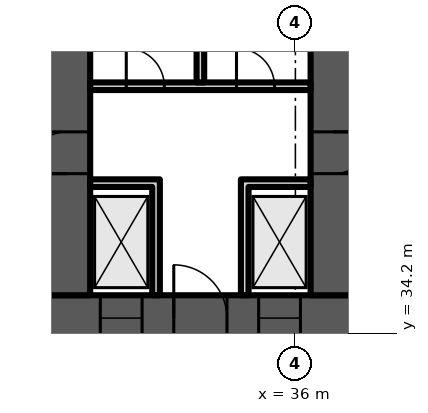
"""IFC4 building model, lengths in metres.
Left out: names, types, materials, properties, quantities, classifications, styles, units other than length and angle.
Written with IfcOpenShell. Run it as: python <this file> out.ifc"""

import sys

from ifc_helpers import new_model, si_unit, direction, frame, frame_2d, origin, place, context, subcontext, project, spatial, polyline, rectangle, outline, extrude, element, fill, save


model = new_model("IFC4")
c1 = context("Model", 3, precision=1e-05, world=origin(), true_north=direction((0.0, 1.0)))
c2 = subcontext(c1, "Body", "Model", "MODEL_VIEW")
j1 = project(units=[si_unit("LENGTHUNIT", "METRE"), si_unit("PLANEANGLEUNIT", "RADIAN")], contexts=[c1])
p1 = place(None, origin())
s1 = spatial("IfcSite", under=j1, at=p1, CompositionType="ELEMENT")
p2 = place(p1, origin())
s2 = spatial("IfcBuilding", under=s1, at=p2, CompositionType="ELEMENT")
p3 = place(p2, frame((0.0, 0.0, 33.0)))
s3 = spatial("IfcBuildingStorey", under=s2, at=p3, CompositionType="ELEMENT", Elevation=33.0)
p4 = place(p3, frame((9.0, 34.6, 0.0), z_axis=(0.0, 0.0, 1.0), x_axis=(1.0, 0.0, 0.0)))
e1 = element("IfcWall", 1, at=p4, inside=s3, PredefinedType="SHEAR", context=c2, shape_type="SweptSolid", body=[
    extrude(rectangle(XDim=56.0, YDim=1.2, at=frame_2d((28.0, 0.0))), origin(), (0.0, 0.0, 1.0), 8.1),
])
p5 = place(p4, frame((2.0, 0.0, 0.0)))
e2 = element("IfcOpeningElement", 2, at=p5, cuts=e1, PredefinedType="OPENING", context=c2, shape_type="SweptSolid", body=[
    extrude(rectangle(XDim=1.0, YDim=2.1, at=frame_2d((0.5, 1.05))), frame((0.0, 0.61, 0.0), z_axis=(0.0, -1.0, 0.0), x_axis=(1.0, 0.0, 0.0)), (0.0, 0.0, 1.0), 1.22),
])
p6 = place(p4, frame((4.6, 0.0, 0.0)))
e3 = element("IfcOpeningElement", 3, at=p6, cuts=e1, PredefinedType="OPENING", context=c2, shape_type="SweptSolid", body=[
    extrude(rectangle(XDim=1.0, YDim=2.1, at=frame_2d((0.5, 1.05))), frame((0.0, 0.61, 0.0), z_axis=(0.0, -1.0, 0.0), x_axis=(1.0, 0.0, 0.0)), (0.0, 0.0, 1.0), 1.22),
])
p7 = place(p4, frame((7.867, 0.0, 0.0)))
e4 = element("IfcOpeningElement", 4, at=p7, cuts=e1, PredefinedType="OPENING", context=c2, shape_type="SweptSolid", body=[
    extrude(rectangle(XDim=1.1, YDim=2.1, at=frame_2d((0.55, 1.05))), frame((0.0, 0.61, 0.0), z_axis=(0.0, -1.0, 0.0), x_axis=(1.0, 0.0, 0.0)), (0.0, 0.0, 1.0), 1.22),
])
p8 = place(p4, frame((12.033, 0.0, 0.0)))
e5 = element("IfcOpeningElement", 5, at=p8, cuts=e1, PredefinedType="OPENING", context=c2, shape_type="SweptSolid", body=[
    extrude(rectangle(XDim=1.1, YDim=2.1, at=frame_2d((0.55, 1.05))), frame((0.0, 0.61, 0.0), z_axis=(0.0, -1.0, 0.0), x_axis=(1.0, 0.0, 0.0)), (0.0, 0.0, 1.0), 1.22),
])
p9 = place(p4, frame((9.8, 0.0, 0.0)))
e6 = element("IfcOpeningElement", 6, at=p9, cuts=e1, PredefinedType="OPENING", context=c2, shape_type="SweptSolid", body=[
    extrude(rectangle(XDim=1.4, YDim=2.1, at=frame_2d((0.7, 1.05))), frame((0.0, 0.61, 0.0), z_axis=(0.0, -1.0, 0.0), x_axis=(1.0, 0.0, 0.0)), (0.0, 0.0, 1.0), 1.22),
])
p10 = place(p4, frame((14.65, 0.0, 0.0)))
e7 = element("IfcOpeningElement", 7, at=p10, cuts=e1, PredefinedType="OPENING", context=c2, shape_type="SweptSolid", body=[
    extrude(rectangle(XDim=1.2, YDim=2.1, at=frame_2d((0.6, 1.05))), frame((0.0, 0.61, 0.0), z_axis=(0.0, -1.0, 0.0), x_axis=(1.0, 0.0, 0.0)), (0.0, 0.0, 1.0), 1.22),
])
p11 = place(p4, frame((21.867, 0.0, 0.0)))
e8 = element("IfcOpeningElement", 8, at=p11, cuts=e1, PredefinedType="OPENING", context=c2, shape_type="SweptSolid", body=[
    extrude(rectangle(XDim=1.1, YDim=2.1, at=frame_2d((0.55, 1.05))), frame((0.0, 0.61, 0.0), z_axis=(0.0, -1.0, 0.0), x_axis=(1.0, 0.0, 0.0)), (0.0, 0.0, 1.0), 1.22),
])
p12 = place(p4, frame((26.033, 0.0, 0.0)))
e9 = element("IfcOpeningElement", 9, at=p12, cuts=e1, PredefinedType="OPENING", context=c2, shape_type="SweptSolid", body=[
    extrude(rectangle(XDim=1.1, YDim=2.1, at=frame_2d((0.55, 1.05))), frame((0.0, 0.61, 0.0), z_axis=(0.0, -1.0, 0.0), x_axis=(1.0, 0.0, 0.0)), (0.0, 0.0, 1.0), 1.22),
])
p13 = place(p4, frame((23.8, 0.0, 0.0)))
e10 = element("IfcOpeningElement", 10, at=p13, cuts=e1, PredefinedType="OPENING", context=c2, shape_type="SweptSolid", body=[
    extrude(rectangle(XDim=1.4, YDim=2.1, at=frame_2d((0.7, 1.05))), frame((0.0, 0.61, 0.0), z_axis=(0.0, -1.0, 0.0), x_axis=(1.0, 0.0, 0.0)), (0.0, 0.0, 1.0), 1.22),
])
p14 = place(p4, frame((28.867, 0.0, 0.0)))
e11 = element("IfcOpeningElement", 11, at=p14, cuts=e1, PredefinedType="OPENING", context=c2, shape_type="SweptSolid", body=[
    extrude(rectangle(XDim=1.1, YDim=2.1, at=frame_2d((0.55, 1.05))), frame((0.0, 0.61, 0.0), z_axis=(0.0, -1.0, 0.0), x_axis=(1.0, 0.0, 0.0)), (0.0, 0.0, 1.0), 1.22),
])
p15 = place(p4, frame((33.033, 0.0, 0.0)))
e12 = element("IfcOpeningElement", 12, at=p15, cuts=e1, PredefinedType="OPENING", context=c2, shape_type="SweptSolid", body=[
    extrude(rectangle(XDim=1.1, YDim=2.1, at=frame_2d((0.55, 1.05))), frame((0.0, 0.61, 0.0), z_axis=(0.0, -1.0, 0.0), x_axis=(1.0, 0.0, 0.0)), (0.0, 0.0, 1.0), 1.22),
])
p16 = place(p4, frame((40.15, 0.0, 0.0)))
e13 = element("IfcOpeningElement", 13, at=p16, cuts=e1, PredefinedType="OPENING", context=c2, shape_type="SweptSolid", body=[
    extrude(rectangle(XDim=1.2, YDim=2.1, at=frame_2d((0.6, 1.05))), frame((0.0, 0.61, 0.0), z_axis=(0.0, -1.0, 0.0), x_axis=(1.0, 0.0, 0.0)), (0.0, 0.0, 1.0), 1.22),
])
p17 = place(p4, frame((44.8, 0.0, 0.0)))
e14 = element("IfcOpeningElement", 14, at=p17, cuts=e1, PredefinedType="OPENING", context=c2, shape_type="SweptSolid", body=[
    extrude(rectangle(XDim=1.4, YDim=2.1, at=frame_2d((0.7, 1.05))), frame((0.0, 0.61, 0.0), z_axis=(0.0, -1.0, 0.0), x_axis=(1.0, 0.0, 0.0)), (0.0, 0.0, 1.0), 1.22),
])
p18 = place(p4, frame((49.867, 0.0, 0.0)))
e15 = element("IfcOpeningElement", 15, at=p18, cuts=e1, PredefinedType="OPENING", context=c2, shape_type="SweptSolid", body=[
    extrude(rectangle(XDim=1.1, YDim=2.1, at=frame_2d((0.55, 1.05))), frame((0.0, 0.61, 0.0), z_axis=(0.0, -1.0, 0.0), x_axis=(1.0, 0.0, 0.0)), (0.0, 0.0, 1.0), 1.22),
])
p19 = place(p4, frame((53.5, 0.0, 0.0)))
e16 = element("IfcOpeningElement", 16, at=p19, cuts=e1, PredefinedType="OPENING", context=c2, shape_type="SweptSolid", body=[
    extrude(rectangle(XDim=1.1, YDim=2.1, at=frame_2d((0.55, 1.05))), frame((0.0, 0.61, 0.0), z_axis=(0.0, -1.0, 0.0), x_axis=(1.0, 0.0, 0.0)), (0.0, 0.0, 1.0), 1.22),
])
p20 = place(p4, frame((51.567, 0.0, 0.0)))
e17 = element("IfcOpeningElement", 17, at=p20, cuts=e1, PredefinedType="OPENING", context=c2, shape_type="SweptSolid", body=[
    extrude(rectangle(XDim=1.4, YDim=2.1, at=frame_2d((0.7, 1.05))), frame((0.0, 0.61, 0.0), z_axis=(0.0, -1.0, 0.0), x_axis=(1.0, 0.0, 0.0)), (0.0, 0.0, 1.0), 1.22),
])
p21 = place(p3, frame((30.0, 35.2, 0.0), z_axis=(0.0, 0.0, 1.0), x_axis=(0.0, 1.0, 0.0)))
e18 = element("IfcWall", 18, at=p21, inside=s3, PredefinedType="SHEAR", context=c2, shape_type="SweptSolid", body=[
    extrude(rectangle(XDim=12.8, YDim=1.2, at=frame_2d((6.4, 0.0))), origin(), (0.0, 0.0, 1.0), 8.1),
])
p22 = place(p21, frame((3.2, 0.0, 0.0)))
e19 = element("IfcOpeningElement", 19, at=p22, cuts=e18, PredefinedType="OPENING", context=c2, shape_type="SweptSolid", body=[
    extrude(rectangle(XDim=1.1, YDim=2.1, at=frame_2d((0.55, 1.05))), frame((0.0, 0.61, 0.0), z_axis=(0.0, -1.0, 0.0), x_axis=(1.0, 0.0, 0.0)), (0.0, 0.0, 1.0), 1.22),
])
p23 = place(p3, frame((37.0, 35.2, 0.0), z_axis=(0.0, 0.0, 1.0), x_axis=(0.0, 1.0, 0.0)))
e20 = element("IfcWall", 20, at=p23, inside=s3, PredefinedType="SHEAR", context=c2, shape_type="SweptSolid", body=[
    extrude(rectangle(XDim=12.8, YDim=1.2, at=frame_2d((6.4, 0.0))), origin(), (0.0, 0.0, 1.0), 8.1),
])
p24 = place(p23, frame((3.2, 0.0, 0.0)))
e21 = element("IfcOpeningElement", 21, at=p24, cuts=e20, PredefinedType="OPENING", context=c2, shape_type="SweptSolid", body=[
    extrude(rectangle(XDim=1.1, YDim=2.1, at=frame_2d((0.55, 1.05))), frame((0.0, 0.61, 0.0), z_axis=(0.0, -1.0, 0.0), x_axis=(1.0, 0.0, 0.0)), (0.0, 0.0, 1.0), 1.22),
])
p25 = place(p23, frame((9.6, 0.0, 0.0)))
e22 = element("IfcOpeningElement", 22, at=p25, cuts=e20, PredefinedType="OPENING", context=c2, shape_type="SweptSolid", body=[
    extrude(rectangle(XDim=1.0, YDim=2.1, at=frame_2d((0.5, 1.05))), frame((0.0, 0.61, 0.0), z_axis=(0.0, -1.0, 0.0), x_axis=(1.0, 0.0, 0.0)), (0.0, 0.0, 1.0), 1.22),
])
p26 = place(p3, frame((30.6, 40.7, 0.0), z_axis=(0.0, 0.0, 1.0), x_axis=(1.0, 0.0, 0.0)))
e23 = element("IfcWall", 23, at=p26, inside=s3, PredefinedType="PARTITIONING", context=c2, shape_type="SweptSolid", body=[
    extrude(rectangle(XDim=5.8, YDim=0.2, at=frame_2d((2.9, 0.0))), origin(), (0.0, 0.0, 1.0), 8.1),
])
p27 = place(p26, frame((0.95, 0.0, 0.0)))
e24 = element("IfcOpeningElement", 24, at=p27, cuts=e23, PredefinedType="OPENING", context=c2, shape_type="SweptSolid", body=[
    extrude(rectangle(XDim=1.0, YDim=2.1, at=frame_2d((0.5, 1.05))), frame((0.0, 0.11, 0.0), z_axis=(0.0, -1.0, 0.0), x_axis=(1.0, 0.0, 0.0)), (0.0, 0.0, 1.0), 0.22),
])
p28 = place(p26, frame((3.85, 0.0, 0.0)))
e25 = element("IfcOpeningElement", 25, at=p28, cuts=e23, PredefinedType="OPENING", context=c2, shape_type="SweptSolid", body=[
    extrude(rectangle(XDim=1.0, YDim=2.1, at=frame_2d((0.5, 1.05))), frame((0.0, 0.11, 0.0), z_axis=(0.0, -1.0, 0.0), x_axis=(1.0, 0.0, 0.0)), (0.0, 0.0, 1.0), 0.22),
])
p29 = place(p3, origin())
e26 = element("IfcWall", 26, at=p29, inside=s3, PredefinedType="PARTITIONING", context=c2, shape_type="SweptSolid", body=[
    extrude(outline(polyline([(32.233, 38.05), (30.6, 38.05), (30.6, 38.25), (32.233, 38.25), (32.433, 38.25), (32.433, 35.2), (32.233, 35.2), (32.233, 38.05)])), origin(), (0.0, 0.0, 1.0), 8.1),
])
p30 = place(p3, origin())
e27 = element("IfcWall", 27, at=p30, inside=s3, PredefinedType="PARTITIONING", context=c2, shape_type="SweptSolid", body=[
    extrude(outline(polyline([(34.567, 38.25), (34.767, 38.25), (36.4, 38.25), (36.4, 38.05), (34.767, 38.05), (34.767, 35.2), (34.567, 35.2), (34.567, 38.25)])), origin(), (0.0, 0.0, 1.0), 8.1),
])
p31 = place(p3, frame((33.5, 40.8, 0.0), z_axis=(0.0, 0.0, 1.0), x_axis=(0.0, 1.0, 0.0)))
e28 = element("IfcWall", 28, at=p31, inside=s3, PredefinedType="PARTITIONING", context=c2, shape_type="SweptSolid", body=[
    extrude(rectangle(XDim=8.653, YDim=0.2, at=frame_2d((4.326, 0.0))), origin(), (0.0, 0.0, 1.0), 8.1),
])
p32 = place(p11, origin())
e29 = element("IfcDoor", 29, at=p32, inside=s3, OperationType="DOUBLE_DOOR_SLIDING", PredefinedType="DOOR", context=c2, shape_type="SweptSolid", body=[
    extrude(rectangle(XDim=1.1, YDim=2.1, at=frame_2d((0.55, 1.05))), frame((0.0, 0.025, 0.0), z_axis=(0.0, -1.0, 0.0), x_axis=(1.0, 0.0, 0.0)), (0.0, 0.0, 1.0), 0.05),
])
fill(e8, e29)
p33 = place(p12, origin())
e30 = element("IfcDoor", 30, at=p33, inside=s3, OperationType="DOUBLE_DOOR_SLIDING", PredefinedType="DOOR", context=c2, shape_type="SweptSolid", body=[
    extrude(rectangle(XDim=1.1, YDim=2.1, at=frame_2d((0.55, 1.05))), frame((0.0, 0.025, 0.0), z_axis=(0.0, -1.0, 0.0), x_axis=(1.0, 0.0, 0.0)), (0.0, 0.0, 1.0), 0.05),
])
fill(e9, e30)
p34 = place(p13, origin())
e31 = element("IfcDoor", 31, at=p34, inside=s3, OperationType="DOUBLE_DOOR_SINGLE_SWING", PredefinedType="DOOR", context=c2, shape_type="SweptSolid", body=[
    extrude(rectangle(XDim=1.4, YDim=2.1, at=frame_2d((0.7, 1.05))), frame((0.0, 0.025, 0.0), z_axis=(0.0, -1.0, 0.0), x_axis=(1.0, 0.0, 0.0)), (0.0, 0.0, 1.0), 0.05),
])
fill(e10, e31)
p35 = place(p27, origin())
e32 = element("IfcDoor", 32, at=p35, inside=s3, OperationType="SINGLE_SWING_LEFT", PredefinedType="DOOR", context=c2, shape_type="SweptSolid", body=[
    extrude(rectangle(XDim=1.0, YDim=2.1, at=frame_2d((0.5, 1.05))), frame((0.0, 0.025, 0.0), z_axis=(0.0, -1.0, 0.0), x_axis=(1.0, 0.0, 0.0)), (0.0, 0.0, 1.0), 0.05),
])
fill(e24, e32)
p36 = place(p28, origin())
e33 = element("IfcDoor", 33, at=p36, inside=s3, OperationType="SINGLE_SWING_LEFT", PredefinedType="DOOR", context=c2, shape_type="SweptSolid", body=[
    extrude(rectangle(XDim=1.0, YDim=2.1, at=frame_2d((0.5, 1.05))), frame((0.0, 0.025, 0.0), z_axis=(0.0, -1.0, 0.0), x_axis=(1.0, 0.0, 0.0)), (0.0, 0.0, 1.0), 0.05),
])
fill(e25, e33)
p37 = place(p22, origin())
e34 = element("IfcDoor", 34, at=p37, inside=s3, OperationType="SINGLE_SWING_LEFT", PredefinedType="DOOR", context=c2, shape_type="SweptSolid", body=[
    extrude(rectangle(XDim=1.1, YDim=2.1, at=frame_2d((0.55, 1.05))), frame((0.0, 0.025, 0.0), z_axis=(0.0, -1.0, 0.0), x_axis=(1.0, 0.0, 0.0)), (0.0, 0.0, 1.0), 0.05),
])
fill(e19, e34)
p38 = place(p24, origin())
e35 = element("IfcDoor", 35, at=p38, inside=s3, OperationType="SINGLE_SWING_RIGHT", PredefinedType="DOOR", context=c2, shape_type="SweptSolid", body=[
    extrude(rectangle(XDim=1.1, YDim=2.1, at=frame_2d((0.55, 1.05))), frame((0.0, 0.025, 0.0), z_axis=(0.0, -1.0, 0.0), x_axis=(1.0, 0.0, 0.0)), (0.0, 0.0, 1.0), 0.05),
])
fill(e21, e35)
save(model, sys.argv[1])
